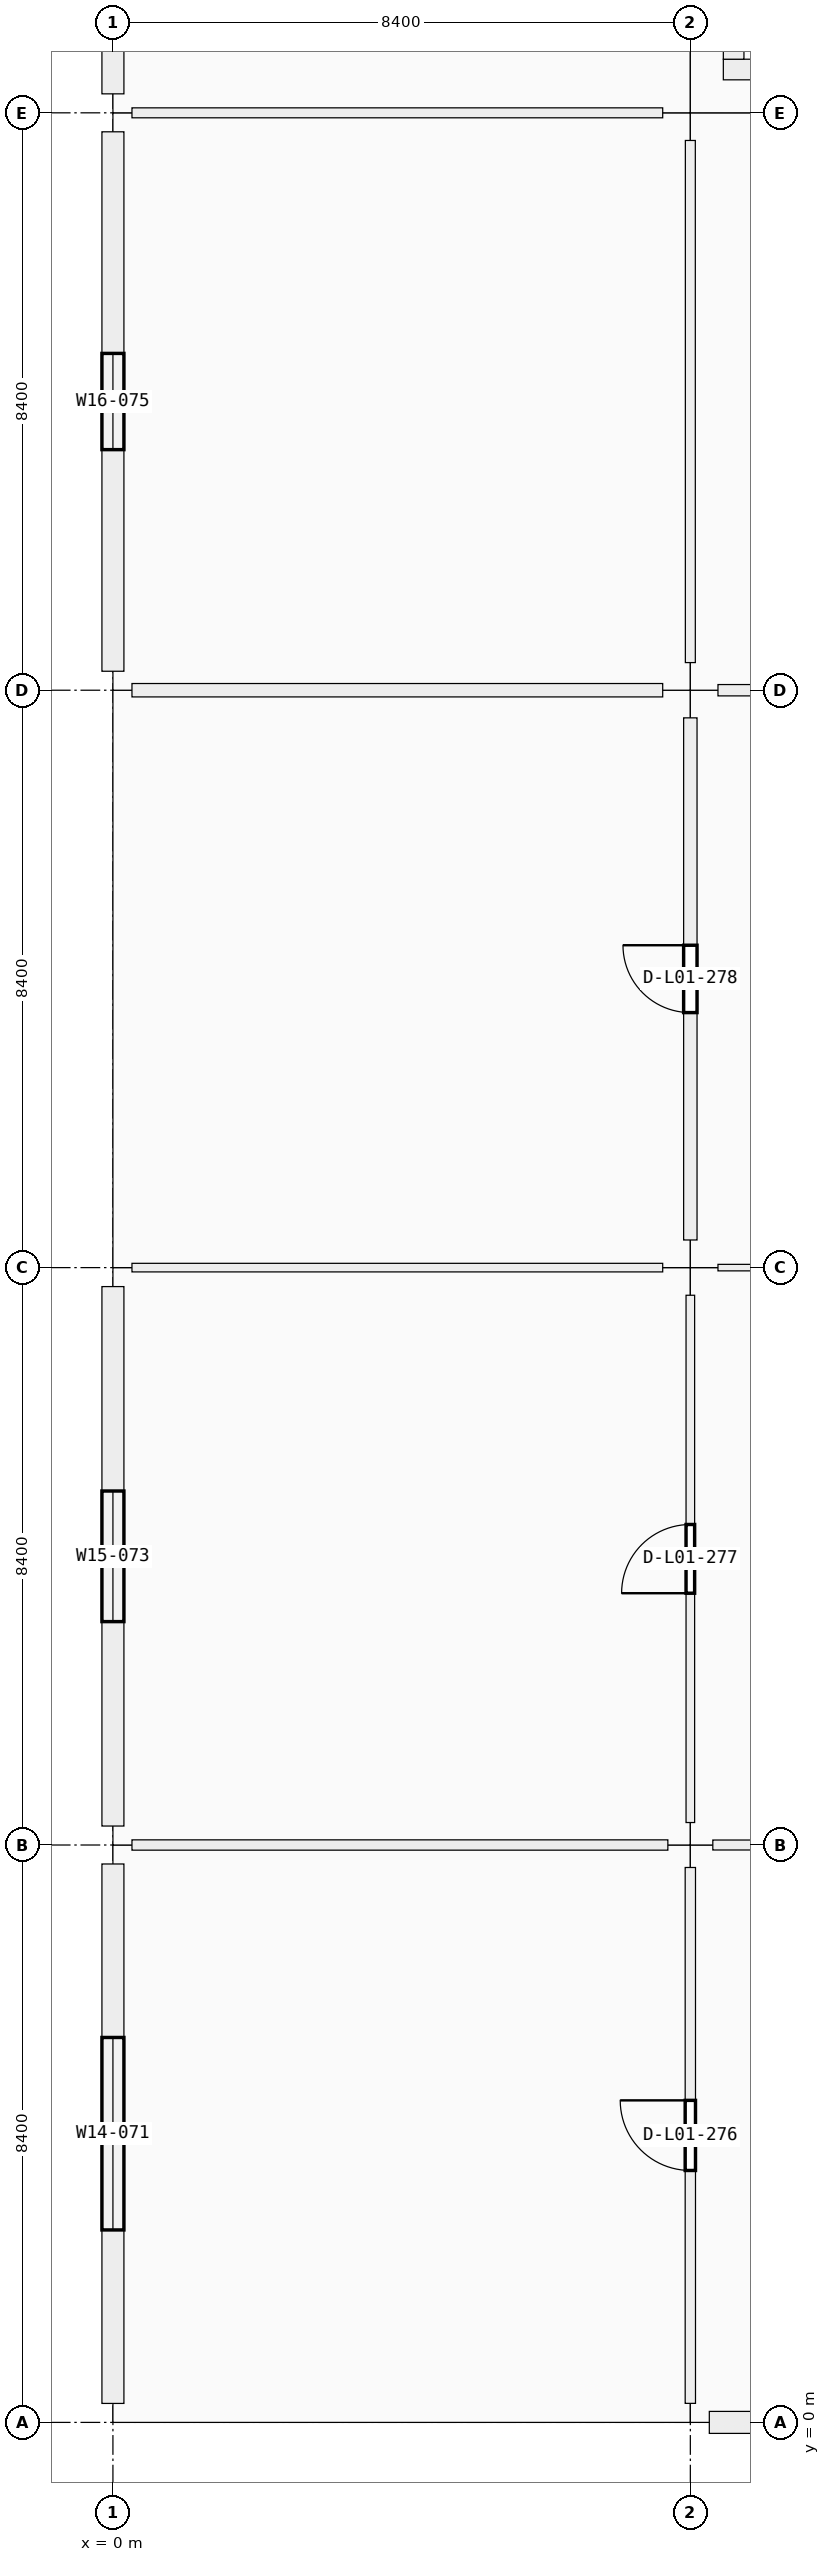
"""IFC4 building model, lengths in metres.
Left out: names, types, materials, properties, quantities, classifications, styles, units other than length and angle.
Written with IfcOpenShell. Run it as: python <this file> out.ifc"""

import sys

from ifc_helpers import new_model, si_unit, direction, frame, frame_2d, origin, origin_2d, place, context, subcontext, project, spatial, rectangle, extrude, element, fill, save


model = new_model("IFC4")
c1 = context("Model", 3, precision=1e-05, world=origin(), true_north=direction((0.0, 1.0)))
c2 = subcontext(c1, "Body", "Model", "MODEL_VIEW")
j1 = project(units=[si_unit("LENGTHUNIT", "METRE"), si_unit("PLANEANGLEUNIT", "RADIAN")], contexts=[c1])
p1 = place(None, origin())
s1 = spatial("IfcSite", under=j1, at=p1, CompositionType="ELEMENT")
p2 = place(p1, origin())
s2 = spatial("IfcBuilding", under=s1, at=p2, CompositionType="ELEMENT")
p3 = place(p2, frame((0.0, 0.0, 5.76)))
s3 = spatial("IfcBuildingStorey", under=s2, at=p3, CompositionType="ELEMENT", Elevation=5.76)
for number, where, z_axis, x_axis in (
    (1, (0.0, 0.0, 0.0), (0.0, 0.0, 1.0), (1.0, 0.0, 0.0)),
    (2, (0.0, 8.4, 0.0), (0.0, 0.0, 1.0), (1.0, 0.0, 0.0)),
    (3, (0.0, 16.8, 0.0), (0.0, 0.0, 1.0), (1.0, 0.0, 0.0)),
    (4, (0.0, 25.2, 0.0), (0.0, 0.0, 1.0), (1.0, 0.0, 0.0)),
    (5, (0.0, 33.6, 0.0), (0.0, 0.0, 1.0), (1.0, 0.0, 0.0)),
    (6, (8.4, 0.0, 0.0), (0.0, 0.0, 1.0), (1.0, 0.0, 0.0)),
):
    element("IfcColumn", number, at=place(p3, frame(where, z_axis=z_axis, x_axis=x_axis)), inside=s3, PredefinedType="COLUMN", context=c2, shape_type="SweptSolid", body=[
        extrude(rectangle(XDim=0.55, YDim=0.55, at=origin_2d()), origin(), (0.0, 0.0, 1.0), 4.2),
    ])
p4 = place(p3, frame((8.4, 8.4, 0.0), z_axis=(0.0, 0.0, 1.0), x_axis=(1.0, 0.0, 0.0)))
e7 = element("IfcColumn", 7, at=p4, inside=s3, PredefinedType="COLUMN", context=c2, shape_type="SweptSolid", body=[
    extrude(rectangle(XDim=0.65, YDim=0.65, at=origin_2d()), origin(), (0.0, 0.0, 1.0), 4.5),
])
for number, where, z_axis, x_axis in (
    (8, (8.4, 16.8, 0.0), (0.0, 0.0, 1.0), (1.0, 0.0, 0.0)),
    (9, (8.4, 25.2, 0.0), (0.0, 0.0, 1.0), (1.0, 0.0, 0.0)),
    (10, (8.4, 33.6, 0.0), (0.0, 0.0, 1.0), (1.0, 0.0, 0.0)),
):
    element("IfcColumn", number, at=place(p3, frame(where, z_axis=z_axis, x_axis=x_axis)), inside=s3, PredefinedType="COLUMN", context=c2, shape_type="SweptSolid", body=[
        extrude(rectangle(XDim=0.8, YDim=0.8, at=origin_2d()), origin(), (0.0, 0.0, 1.0), 4.5),
    ])
p5 = place(p3, frame((0.0, 0.276, 0.0), z_axis=(0.0, 0.0, 1.0), x_axis=(0.0, 1.0, 0.0)))
e11 = element("IfcWall", 11, at=p5, inside=s3, PredefinedType="SOLIDWALL", context=c2, shape_type="SweptSolid", body=[
    extrude(rectangle(XDim=7.848, YDim=0.32, at=frame_2d((3.924, 0.0))), origin(), (0.0, 0.0, 1.0), 3.4),
])
p6 = place(p5, frame((2.524, 0.0, 0.9)))
e12 = element("IfcOpeningElement", 12, at=p6, cuts=e11, PredefinedType="OPENING", context=c2, shape_type="SweptSolid", body=[
    extrude(rectangle(XDim=2.8, YDim=1.75, at=frame_2d((1.4, 0.875))), frame((0.0, 0.16, 0.0), z_axis=(0.0, -1.0, 0.0), x_axis=(1.0, 0.0, 0.0)), (0.0, 0.0, 1.0), 0.32),
])
p7 = place(p3, frame((0.0, 8.676, 0.0), z_axis=(0.0, 0.0, 1.0), x_axis=(0.0, 1.0, 0.0)))
e13 = element("IfcWall", 13, at=p7, inside=s3, PredefinedType="SOLIDWALL", context=c2, shape_type="SweptSolid", body=[
    extrude(rectangle(XDim=7.848, YDim=0.32, at=frame_2d((3.924, 0.0))), origin(), (0.0, 0.0, 1.0), 3.4),
])
p8 = place(p7, frame((2.974, 0.0, 0.9)))
e14 = element("IfcOpeningElement", 14, at=p8, cuts=e13, PredefinedType="OPENING", context=c2, shape_type="SweptSolid", body=[
    extrude(rectangle(XDim=1.9, YDim=1.75, at=frame_2d((0.95, 0.875))), frame((0.0, 0.16, 0.0), z_axis=(0.0, -1.0, 0.0), x_axis=(1.0, 0.0, 0.0)), (0.0, 0.0, 1.0), 0.32),
])
p9 = place(p3, frame((0.0, 25.476, 0.0), z_axis=(0.0, 0.0, 1.0), x_axis=(0.0, 1.0, 0.0)))
e15 = element("IfcWall", 15, at=p9, inside=s3, PredefinedType="SOLIDWALL", context=c2, shape_type="SweptSolid", body=[
    extrude(rectangle(XDim=7.848, YDim=0.32, at=frame_2d((3.924, 0.0))), origin(), (0.0, 0.0, 1.0), 3.4),
])
p10 = place(p9, frame((3.224, 0.0, 0.9)))
e16 = element("IfcOpeningElement", 16, at=p10, cuts=e15, PredefinedType="OPENING", context=c2, shape_type="SweptSolid", body=[
    extrude(rectangle(XDim=1.4, YDim=1.75, at=frame_2d((0.7, 0.875))), frame((0.0, 0.16, 0.0), z_axis=(0.0, -1.0, 0.0), x_axis=(1.0, 0.0, 0.0)), (0.0, 0.0, 1.0), 0.32),
])
p11 = place(p3, frame((0.0, 33.876, 0.0), z_axis=(0.0, 0.0, 1.0), x_axis=(0.0, 1.0, 0.0)))
e17 = element("IfcWall", 17, at=p11, inside=s3, PredefinedType="SOLIDWALL", context=c2, shape_type="SweptSolid", body=[
    extrude(rectangle(XDim=7.848, YDim=0.32, at=frame_2d((3.924, 0.0))), origin(), (0.0, 0.0, 1.0), 3.4),
])
p12 = place(p11, frame((2.324, 0.0, 0.9)))
e18 = element("IfcOpeningElement", 18, at=p12, cuts=e17, PredefinedType="OPENING", context=c2, shape_type="SweptSolid", body=[
    extrude(rectangle(XDim=3.2, YDim=1.75, at=frame_2d((1.6, 0.875))), frame((0.0, 0.16, 0.0), z_axis=(0.0, -1.0, 0.0), x_axis=(1.0, 0.0, 0.0)), (0.0, 0.0, 1.0), 0.32),
])
p13 = place(p3, frame((16.524, 0.0, 0.0), z_axis=(0.0, 0.0, 1.0), x_axis=(-1.0, 0.0, 0.0)))
e19 = element("IfcWall", 19, at=p13, inside=s3, PredefinedType="SOLIDWALL", context=c2, shape_type="SweptSolid", body=[
    extrude(rectangle(XDim=7.848, YDim=0.32, at=frame_2d((3.924, 0.0))), origin(), (0.0, 0.0, 1.0), 3.4),
])
p14 = place(p13, frame((3.249, 0.0, 0.9)))
e20 = element("IfcOpeningElement", 20, at=p14, cuts=e19, PredefinedType="OPENING", context=c2, shape_type="SweptSolid", body=[
    extrude(rectangle(XDim=1.35, YDim=1.5, at=frame_2d((0.675, 0.75))), frame((0.0, 0.16, 0.0), z_axis=(0.0, -1.0, 0.0), x_axis=(1.0, 0.0, 0.0)), (0.0, 0.0, 1.0), 0.32),
])
p15 = place(p3, frame((16.32, 34.23, 0.0), z_axis=(0.0, 0.0, 1.0), x_axis=(-1.0, 0.0, 0.0)))
e21 = element("IfcWall", 21, at=p15, inside=s3, PredefinedType="SHEAR", context=c2, shape_type="SweptSolid", body=[
    extrude(rectangle(XDim=7.44, YDim=0.3, at=frame_2d((3.72, 0.0))), origin(), (0.0, 0.0, 1.0), 4.5),
])
p16 = place(p15, frame((1.28, 0.0, 0.0)))
e22 = element("IfcOpeningElement", 22, at=p16, cuts=e21, PredefinedType="OPENING", context=c2, shape_type="SweptSolid", body=[
    extrude(rectangle(XDim=1.5, YDim=2.15, at=frame_2d((0.75, 1.075))), frame((0.0, 0.15, 0.0), z_axis=(0.0, -1.0, 0.0), x_axis=(1.0, 0.0, 0.0)), (0.0, 0.0, 1.0), 0.3),
])
p17 = place(p3, frame((9.03, 34.38, 0.0), z_axis=(0.0, 0.0, 1.0), x_axis=(0.0, 1.0, 0.0)))
e23 = element("IfcWall", 23, at=p17, inside=s3, PredefinedType="SHEAR", context=c2, shape_type="SweptSolid", body=[
    extrude(rectangle(XDim=6.84, YDim=0.3, at=frame_2d((3.42, 0.0))), origin(), (0.0, 0.0, 1.0), 4.5),
])
p18 = place(p3, frame((0.277, 8.4, 0.0), z_axis=(0.0, 0.0, 1.0), x_axis=(1.0, 0.0, 0.0)))
e24 = element("IfcWall", 24, at=p18, inside=s3, PredefinedType="MOVABLE", context=c2, shape_type="SweptSolid", body=[
    extrude(rectangle(XDim=7.796, YDim=0.15, at=frame_2d((3.898, 0.0))), origin(), (0.0, 0.0, 1.0), 2.4),
])
p19 = place(p18, frame((3.358, 0.0, 0.0)))
e25 = element("IfcOpeningElement", 25, at=p19, cuts=e24, PredefinedType="OPENING", context=c2, shape_type="SweptSolid", body=[
    extrude(rectangle(XDim=1.08, YDim=2.22, at=frame_2d((0.54, 1.11))), frame((0.0, 0.075, 0.0), z_axis=(0.0, -1.0, 0.0), x_axis=(1.0, 0.0, 0.0)), (0.0, 0.0, 1.0), 0.15),
])
p20 = place(p3, frame((0.277, 16.8, 0.0), z_axis=(0.0, 0.0, 1.0), x_axis=(1.0, 0.0, 0.0)))
e26 = element("IfcWall", 26, at=p20, inside=s3, PredefinedType="PARTITIONING", context=c2, shape_type="SweptSolid", body=[
    extrude(rectangle(XDim=7.721, YDim=0.125, at=frame_2d((3.86, 0.0))), origin(), (0.0, 0.0, 1.0), 2.4),
])
p21 = place(p20, frame((3.33, 0.0, 0.0)))
e27 = element("IfcOpeningElement", 27, at=p21, cuts=e26, PredefinedType="OPENING", context=c2, shape_type="SweptSolid", body=[
    extrude(rectangle(XDim=1.06, YDim=2.22, at=frame_2d((0.53, 1.11))), frame((0.0, 0.062, 0.0), z_axis=(0.0, -1.0, 0.0), x_axis=(1.0, 0.0, 0.0)), (0.0, 0.0, 1.0), 0.125),
])
p22 = place(p3, frame((0.277, 25.2, 0.0), z_axis=(0.0, 0.0, 1.0), x_axis=(1.0, 0.0, 0.0)))
e28 = element("IfcWall", 28, at=p22, inside=s3, PredefinedType="PARTITIONING", context=c2, shape_type="SweptSolid", body=[
    extrude(rectangle(XDim=7.721, YDim=0.195, at=frame_2d((3.86, 0.0))), origin(), (0.0, 0.0, 1.0), 2.4),
])
p23 = place(p22, frame((3.396, 0.0, 0.0)))
e29 = element("IfcOpeningElement", 29, at=p23, cuts=e28, PredefinedType="OPENING", context=c2, shape_type="SweptSolid", body=[
    extrude(rectangle(XDim=0.93, YDim=2.12, at=frame_2d((0.465, 1.06))), frame((0.0, 0.098, 0.0), z_axis=(0.0, -1.0, 0.0), x_axis=(1.0, 0.0, 0.0)), (0.0, 0.0, 1.0), 0.195),
])
p24 = place(p3, frame((0.277, 33.6, 0.0), z_axis=(0.0, 0.0, 1.0), x_axis=(1.0, 0.0, 0.0)))
e30 = element("IfcWall", 30, at=p24, inside=s3, PredefinedType="PARTITIONING", context=c2, shape_type="SweptSolid", body=[
    extrude(rectangle(XDim=7.721, YDim=0.145, at=frame_2d((3.86, 0.0))), origin(), (0.0, 0.0, 1.0), 2.4),
])
p25 = place(p24, frame((3.341, 0.0, 0.0)))
e31 = element("IfcOpeningElement", 31, at=p25, cuts=e30, PredefinedType="OPENING", context=c2, shape_type="SweptSolid", body=[
    extrude(rectangle(XDim=1.04, YDim=2.2, at=frame_2d((0.52, 1.1))), frame((0.0, 0.073, 0.0), z_axis=(0.0, -1.0, 0.0), x_axis=(1.0, 0.0, 0.0)), (0.0, 0.0, 1.0), 0.145),
])
p26 = place(p3, frame((8.727, 8.4, 0.0), z_axis=(0.0, 0.0, 1.0), x_axis=(1.0, 0.0, 0.0)))
e32 = element("IfcWall", 32, at=p26, inside=s3, PredefinedType="PARTITIONING", context=c2, shape_type="SweptSolid", body=[
    extrude(rectangle(XDim=7.771, YDim=0.145, at=frame_2d((3.885, 0.0))), origin(), (0.0, 0.0, 1.0), 2.4),
])
p27 = place(p26, frame((3.415, 0.0, 0.0)))
e33 = element("IfcOpeningElement", 33, at=p27, cuts=e32, PredefinedType="OPENING", context=c2, shape_type="SweptSolid", body=[
    extrude(rectangle(XDim=0.94, YDim=2.15, at=frame_2d((0.47, 1.075))), frame((0.0, 0.073, 0.0), z_axis=(0.0, -1.0, 0.0), x_axis=(1.0, 0.0, 0.0)), (0.0, 0.0, 1.0), 0.145),
])
p28 = place(p3, frame((8.802, 16.8, 0.0), z_axis=(0.0, 0.0, 1.0), x_axis=(1.0, 0.0, 0.0)))
e34 = element("IfcWall", 34, at=p28, inside=s3, PredefinedType="PARTITIONING", context=c2, shape_type="SweptSolid", body=[
    extrude(rectangle(XDim=7.596, YDim=0.095, at=frame_2d((3.798, 0.0))), origin(), (0.0, 0.0, 1.0), 2.4),
])
p29 = place(p28, frame((3.258, 0.0, 0.0)))
e35 = element("IfcOpeningElement", 35, at=p29, cuts=e34, PredefinedType="OPENING", context=c2, shape_type="SweptSolid", body=[
    extrude(rectangle(XDim=1.08, YDim=2.22, at=frame_2d((0.54, 1.11))), frame((0.0, 0.047, 0.0), z_axis=(0.0, -1.0, 0.0), x_axis=(1.0, 0.0, 0.0)), (0.0, 0.0, 1.0), 0.095),
])
p30 = place(p3, frame((8.802, 25.2, 0.0), z_axis=(0.0, 0.0, 1.0), x_axis=(1.0, 0.0, 0.0)))
e36 = element("IfcWall", 36, at=p30, inside=s3, PredefinedType="PARTITIONING", context=c2, shape_type="SweptSolid", body=[
    extrude(rectangle(XDim=7.596, YDim=0.165, at=frame_2d((3.798, 0.0))), origin(), (0.0, 0.0, 1.0), 2.4),
])
p31 = place(p30, frame((3.318, 0.0, 0.0)))
e37 = element("IfcOpeningElement", 37, at=p31, cuts=e36, PredefinedType="OPENING", context=c2, shape_type="SweptSolid", body=[
    extrude(rectangle(XDim=0.96, YDim=2.18, at=frame_2d((0.48, 1.09))), frame((0.0, 0.083, 0.0), z_axis=(0.0, -1.0, 0.0), x_axis=(1.0, 0.0, 0.0)), (0.0, 0.0, 1.0), 0.165),
])
p32 = place(p3, frame((8.4, 0.277, 0.0), z_axis=(0.0, 0.0, 1.0), x_axis=(0.0, 1.0, 0.0)))
e38 = element("IfcWall", 38, at=p32, inside=s3, PredefinedType="MOVABLE", context=c2, shape_type="SweptSolid", body=[
    extrude(rectangle(XDim=7.796, YDim=0.15, at=frame_2d((3.898, 0.0))), origin(), (0.0, 0.0, 1.0), 2.4),
])
p33 = place(p32, frame((3.388, 0.0, 0.0)))
e39 = element("IfcOpeningElement", 39, at=p33, cuts=e38, PredefinedType="OPENING", context=c2, shape_type="SweptSolid", body=[
    extrude(rectangle(XDim=1.02, YDim=2.2, at=frame_2d((0.51, 1.1))), frame((0.0, 0.075, 0.0), z_axis=(0.0, -1.0, 0.0), x_axis=(1.0, 0.0, 0.0)), (0.0, 0.0, 1.0), 0.15),
])
p34 = place(p3, frame((8.4, 8.727, 0.0), z_axis=(0.0, 0.0, 1.0), x_axis=(0.0, 1.0, 0.0)))
e40 = element("IfcWall", 40, at=p34, inside=s3, PredefinedType="PARTITIONING", context=c2, shape_type="SweptSolid", body=[
    extrude(rectangle(XDim=7.671, YDim=0.125, at=frame_2d((3.835, 0.0))), origin(), (0.0, 0.0, 1.0), 2.4),
])
p35 = place(p34, frame((3.336, 0.0, 0.0)))
e41 = element("IfcOpeningElement", 41, at=p35, cuts=e40, PredefinedType="OPENING", context=c2, shape_type="SweptSolid", body=[
    extrude(rectangle(XDim=1.0, YDim=2.2, at=frame_2d((0.5, 1.1))), frame((0.0, 0.062, 0.0), z_axis=(0.0, -1.0, 0.0), x_axis=(1.0, 0.0, 0.0)), (0.0, 0.0, 1.0), 0.125),
])
p36 = place(p3, frame((8.4, 17.202, 0.0), z_axis=(0.0, 0.0, 1.0), x_axis=(0.0, 1.0, 0.0)))
e42 = element("IfcWall", 42, at=p36, inside=s3, PredefinedType="PARTITIONING", context=c2, shape_type="SweptSolid", body=[
    extrude(rectangle(XDim=7.596, YDim=0.195, at=frame_2d((3.798, 0.0))), origin(), (0.0, 0.0, 1.0), 2.4),
])
p37 = place(p36, frame((3.308, 0.0, 0.0)))
e43 = element("IfcOpeningElement", 43, at=p37, cuts=e42, PredefinedType="OPENING", context=c2, shape_type="SweptSolid", body=[
    extrude(rectangle(XDim=0.98, YDim=2.18, at=frame_2d((0.49, 1.09))), frame((0.0, 0.098, 0.0), z_axis=(0.0, -1.0, 0.0), x_axis=(1.0, 0.0, 0.0)), (0.0, 0.0, 1.0), 0.195),
])
p38 = place(p3, frame((8.4, 25.602, 0.0), z_axis=(0.0, 0.0, 1.0), x_axis=(0.0, 1.0, 0.0)))
e44 = element("IfcWall", 44, at=p38, inside=s3, PredefinedType="PARTITIONING", context=c2, shape_type="SweptSolid", body=[
    extrude(rectangle(XDim=7.596, YDim=0.145, at=frame_2d((3.798, 0.0))), origin(), (0.0, 0.0, 1.0), 2.4),
])
p39 = place(p38, frame((3.313, 0.0, 0.0)))
e45 = element("IfcOpeningElement", 45, at=p39, cuts=e44, PredefinedType="OPENING", context=c2, shape_type="SweptSolid", body=[
    extrude(rectangle(XDim=0.97, YDim=2.12, at=frame_2d((0.485, 1.06))), frame((0.0, 0.073, 0.0), z_axis=(0.0, -1.0, 0.0), x_axis=(1.0, 0.0, 0.0)), (0.0, 0.0, 1.0), 0.145),
])
p40 = place(p6, origin())
e46 = element("IfcWindow", 46, at=p40, inside=s3, PartitioningType="SINGLE_PANEL", PredefinedType="WINDOW", context=c2, shape_type="SweptSolid", body=[
    extrude(rectangle(XDim=2.8, YDim=1.75, at=frame_2d((1.4, 0.875))), frame((0.0, 0.03, 0.0), z_axis=(0.0, -1.0, 0.0), x_axis=(1.0, 0.0, 0.0)), (0.0, 0.0, 1.0), 0.06),
])
fill(e12, e46)
p41 = place(p8, origin())
e47 = element("IfcWindow", 47, at=p41, inside=s3, PartitioningType="SINGLE_PANEL", PredefinedType="WINDOW", context=c2, shape_type="SweptSolid", body=[
    extrude(rectangle(XDim=1.9, YDim=1.75, at=frame_2d((0.95, 0.875))), frame((0.0, 0.03, 0.0), z_axis=(0.0, -1.0, 0.0), x_axis=(1.0, 0.0, 0.0)), (0.0, 0.0, 1.0), 0.06),
])
fill(e14, e47)
p42 = place(p10, origin())
e48 = element("IfcWindow", 48, at=p42, inside=s3, PartitioningType="SINGLE_PANEL", PredefinedType="WINDOW", context=c2, shape_type="SweptSolid", body=[
    extrude(rectangle(XDim=1.4, YDim=1.75, at=frame_2d((0.7, 0.875))), frame((0.0, 0.03, 0.0), z_axis=(0.0, -1.0, 0.0), x_axis=(1.0, 0.0, 0.0)), (0.0, 0.0, 1.0), 0.06),
])
fill(e16, e48)
p43 = place(p39, origin())
e49 = element("IfcDoor", 49, at=p43, inside=s3, OperationType="SINGLE_SWING_RIGHT", PredefinedType="DOOR", context=c2, shape_type="SweptSolid", body=[
    extrude(rectangle(XDim=0.97, YDim=2.12, at=frame_2d((0.485, 1.06))), frame((0.0, 0.025, 0.0), z_axis=(0.0, -1.0, 0.0), x_axis=(1.0, 0.0, 0.0)), (0.0, 0.0, 1.0), 0.05),
])
fill(e45, e49)
p44 = place(p19, origin())
e50 = element("IfcDoor", 50, at=p44, inside=s3, OperationType="SINGLE_SWING_LEFT", PredefinedType="DOOR", context=c2, shape_type="SweptSolid", body=[
    extrude(rectangle(XDim=1.08, YDim=2.22, at=frame_2d((0.54, 1.11))), frame((0.0, 0.025, 0.0), z_axis=(0.0, -1.0, 0.0), x_axis=(1.0, 0.0, 0.0)), (0.0, 0.0, 1.0), 0.05),
])
fill(e25, e50)
p45 = place(p21, origin())
e51 = element("IfcDoor", 51, at=p45, inside=s3, OperationType="SINGLE_SWING_RIGHT", PredefinedType="DOOR", context=c2, shape_type="SweptSolid", body=[
    extrude(rectangle(XDim=1.06, YDim=2.22, at=frame_2d((0.53, 1.11))), frame((0.0, 0.025, 0.0), z_axis=(0.0, -1.0, 0.0), x_axis=(1.0, 0.0, 0.0)), (0.0, 0.0, 1.0), 0.05),
])
fill(e27, e51)
p46 = place(p25, origin())
e52 = element("IfcDoor", 52, at=p46, inside=s3, OperationType="SINGLE_SWING_LEFT", PredefinedType="DOOR", context=c2, shape_type="SweptSolid", body=[
    extrude(rectangle(XDim=1.04, YDim=2.2, at=frame_2d((0.52, 1.1))), frame((0.0, 0.025, 0.0), z_axis=(0.0, -1.0, 0.0), x_axis=(1.0, 0.0, 0.0)), (0.0, 0.0, 1.0), 0.05),
])
fill(e31, e52)
p47 = place(p23, origin())
e53 = element("IfcDoor", 53, at=p47, inside=s3, OperationType="SINGLE_SWING_LEFT", PredefinedType="DOOR", context=c2, shape_type="SweptSolid", body=[
    extrude(rectangle(XDim=0.93, YDim=2.12, at=frame_2d((0.465, 1.06))), frame((0.0, 0.025, 0.0), z_axis=(0.0, -1.0, 0.0), x_axis=(1.0, 0.0, 0.0)), (0.0, 0.0, 1.0), 0.05),
])
fill(e29, e53)
p48 = place(p33, origin())
e54 = element("IfcDoor", 54, at=p48, inside=s3, OperationType="SINGLE_SWING_RIGHT", PredefinedType="DOOR", context=c2, shape_type="SweptSolid", body=[
    extrude(rectangle(XDim=1.02, YDim=2.2, at=frame_2d((0.51, 1.1))), frame((0.0, 0.025, 0.0), z_axis=(0.0, -1.0, 0.0), x_axis=(1.0, 0.0, 0.0)), (0.0, 0.0, 1.0), 0.05),
])
fill(e39, e54)
p49 = place(p35, origin())
e55 = element("IfcDoor", 55, at=p49, inside=s3, OperationType="SINGLE_SWING_LEFT", PredefinedType="DOOR", context=c2, shape_type="SweptSolid", body=[
    extrude(rectangle(XDim=1.0, YDim=2.2, at=frame_2d((0.5, 1.1))), frame((0.0, 0.025, 0.0), z_axis=(0.0, -1.0, 0.0), x_axis=(1.0, 0.0, 0.0)), (0.0, 0.0, 1.0), 0.05),
])
fill(e41, e55)
p50 = place(p37, origin())
e56 = element("IfcDoor", 56, at=p50, inside=s3, OperationType="SINGLE_SWING_RIGHT", PredefinedType="DOOR", context=c2, shape_type="SweptSolid", body=[
    extrude(rectangle(XDim=0.98, YDim=2.18, at=frame_2d((0.49, 1.09))), frame((0.0, 0.025, 0.0), z_axis=(0.0, -1.0, 0.0), x_axis=(1.0, 0.0, 0.0)), (0.0, 0.0, 1.0), 0.05),
])
fill(e43, e56)
save(model, sys.argv[1])
